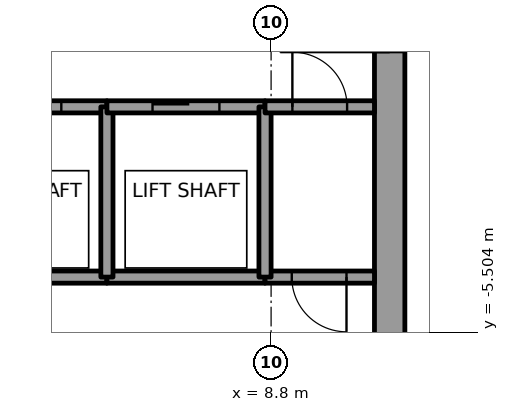
"""IFC4 building model, lengths in metres.
Left out: names, types, materials, properties, quantities, classifications, styles, units other than length and angle.
Written with IfcOpenShell. Run it as: python <this file> out.ifc"""

import sys

from ifc_helpers import new_model, si_unit, direction, frame, frame_2d, origin, place, context, subcontext, project, spatial, rectangle, extrude, element, fill, save


model = new_model("IFC4")
c1 = context("Model", 3, precision=1e-05, world=origin(), true_north=direction((0.0, 1.0)))
c2 = subcontext(c1, "Body", "Model", "MODEL_VIEW")
j1 = project(units=[si_unit("LENGTHUNIT", "METRE"), si_unit("PLANEANGLEUNIT", "RADIAN")], contexts=[c1])
p1 = place(None, origin())
s1 = spatial("IfcSite", under=j1, at=p1, CompositionType="ELEMENT")
p2 = place(p1, origin())
s2 = spatial("IfcBuilding", under=s1, at=p2, CompositionType="ELEMENT")
p3 = place(p2, frame((0.0, 0.0, 275.0)))
s3 = spatial("IfcBuildingStorey", under=s2, at=p3, CompositionType="ELEMENT", Elevation=275.0)
p4 = place(p3, frame((10.75, -7.5, 0.0), z_axis=(0.0, 0.0, 1.0), x_axis=(0.0, 1.0, 0.0)))
e1 = element("IfcWall", 1, at=p4, inside=s3, PredefinedType="SHEAR", context=c2, shape_type="SweptSolid", body=[
    extrude(rectangle(XDim=15.0, YDim=0.5, at=frame_2d((7.5, 0.0))), origin(), (0.0, 0.0, 1.0), 4.0),
])
p5 = place(p4, frame((6.6, 0.0, 0.0)))
e2 = element("IfcOpeningElement", 2, at=p5, cuts=e1, PredefinedType="OPENING", context=c2, shape_type="SweptSolid", body=[
    extrude(rectangle(XDim=1.8, YDim=2.1, at=frame_2d((0.9, 1.05))), frame((0.0, 0.25, 0.0), z_axis=(0.0, -1.0, 0.0), x_axis=(1.0, 0.0, 0.0)), (0.0, 0.0, 1.0), 0.5),
])
p6 = place(p3, frame((3.5, -1.8, 0.0), z_axis=(0.0, 0.0, 1.0), x_axis=(1.0, 0.0, 0.0)))
e3 = element("IfcWall", 3, at=p6, inside=s3, PredefinedType="SOLIDWALL", context=c2, shape_type="SweptSolid", body=[
    extrude(rectangle(XDim=2.6, YDim=0.2, at=frame_2d((1.3, 0.0))), origin(), (0.0, 0.0, 1.0), 3.85),
])
p7 = place(p6, frame((0.75, 0.0, 0.0)))
e4 = element("IfcOpeningElement", 4, at=p7, cuts=e3, PredefinedType="OPENING", context=c2, shape_type="SweptSolid", body=[
    extrude(rectangle(XDim=1.1, YDim=2.1, at=frame_2d((0.55, 1.05))), frame((0.0, 0.1, 0.0), z_axis=(0.0, -1.0, 0.0), x_axis=(1.0, 0.0, 0.0)), (0.0, 0.0, 1.0), 0.2),
])
p8 = place(p3, frame((6.1, -4.6, 0.0), z_axis=(0.0, 0.0, 1.0), x_axis=(-1.0, 0.0, 0.0)))
e5 = element("IfcWall", 5, at=p8, inside=s3, PredefinedType="SOLIDWALL", context=c2, shape_type="SweptSolid", body=[
    extrude(rectangle(XDim=1.6, YDim=0.2, at=frame_2d((0.8, 0.0))), origin(), (0.0, 0.0, 1.0), 3.85),
])
p9 = place(p3, frame((8.7, -4.6, 0.0), z_axis=(0.0, 0.0, 1.0), x_axis=(-1.0, 0.0, 0.0)))
e6 = element("IfcWall", 6, at=p9, inside=s3, PredefinedType="SOLIDWALL", context=c2, shape_type="SweptSolid", body=[
    extrude(rectangle(XDim=2.6, YDim=0.2, at=frame_2d((1.3, 0.0))), origin(), (0.0, 0.0, 1.0), 3.85),
])
p10 = place(p3, frame((6.1, -4.6, 0.0), z_axis=(0.0, 0.0, 1.0), x_axis=(0.0, 1.0, 0.0)))
e7 = element("IfcWall", 7, at=p10, inside=s3, PredefinedType="SOLIDWALL", context=c2, shape_type="SweptSolid", body=[
    extrude(rectangle(XDim=2.8, YDim=0.2, at=frame_2d((1.4, 0.0))), origin(), (0.0, 0.0, 1.0), 3.85),
])
p11 = place(p3, frame((6.1, -1.8, 0.0), z_axis=(0.0, 0.0, 1.0), x_axis=(1.0, 0.0, 0.0)))
e8 = element("IfcWall", 8, at=p11, inside=s3, PredefinedType="SOLIDWALL", context=c2, shape_type="SweptSolid", body=[
    extrude(rectangle(XDim=2.6, YDim=0.2, at=frame_2d((1.3, 0.0))), origin(), (0.0, 0.0, 1.0), 3.85),
])
p12 = place(p11, frame((0.75, 0.0, 0.0)))
e9 = element("IfcOpeningElement", 9, at=p12, cuts=e8, PredefinedType="OPENING", context=c2, shape_type="SweptSolid", body=[
    extrude(rectangle(XDim=1.1, YDim=2.1, at=frame_2d((0.55, 1.05))), frame((0.0, 0.1, 0.0), z_axis=(0.0, -1.0, 0.0), x_axis=(1.0, 0.0, 0.0)), (0.0, 0.0, 1.0), 0.2),
])
p13 = place(p3, frame((10.5, -4.6, 0.0), z_axis=(0.0, 0.0, 1.0), x_axis=(-1.0, 0.0, 0.0)))
e10 = element("IfcWall", 10, at=p13, inside=s3, PredefinedType="SOLIDWALL", context=c2, shape_type="SweptSolid", body=[
    extrude(rectangle(XDim=1.8, YDim=0.2, at=frame_2d((0.9, 0.0))), origin(), (0.0, 0.0, 1.0), 3.85),
])
p14 = place(p13, frame((0.46, 0.0, 0.0)))
e11 = element("IfcOpeningElement", 11, at=p14, cuts=e10, PredefinedType="OPENING", context=c2, shape_type="SweptSolid", body=[
    extrude(rectangle(XDim=0.9, YDim=2.1, at=frame_2d((0.45, 1.05))), frame((0.0, 0.1, 0.0), z_axis=(0.0, -1.0, 0.0), x_axis=(1.0, 0.0, 0.0)), (0.0, 0.0, 1.0), 0.2),
])
p15 = place(p3, frame((8.7, -1.8, 0.0), z_axis=(0.0, 0.0, 1.0), x_axis=(0.0, -1.0, 0.0)))
e12 = element("IfcWall", 12, at=p15, inside=s3, PredefinedType="SOLIDWALL", context=c2, shape_type="SweptSolid", body=[
    extrude(rectangle(XDim=2.8, YDim=0.2, at=frame_2d((1.4, 0.0))), origin(), (0.0, 0.0, 1.0), 3.85),
])
p16 = place(p3, frame((8.7, -1.8, 0.0), z_axis=(0.0, 0.0, 1.0), x_axis=(1.0, 0.0, 0.0)))
e13 = element("IfcWall", 13, at=p16, inside=s3, PredefinedType="SOLIDWALL", context=c2, shape_type="SweptSolid", body=[
    extrude(rectangle(XDim=1.8, YDim=0.2, at=frame_2d((0.9, 0.0))), origin(), (0.0, 0.0, 1.0), 3.85),
])
p17 = place(p16, frame((0.45, 0.0, 0.0)))
e14 = element("IfcOpeningElement", 14, at=p17, cuts=e13, PredefinedType="OPENING", context=c2, shape_type="SweptSolid", body=[
    extrude(rectangle(XDim=0.9, YDim=2.1, at=frame_2d((0.45, 1.05))), frame((0.0, 0.1, 0.0), z_axis=(0.0, -1.0, 0.0), x_axis=(1.0, 0.0, 0.0)), (0.0, 0.0, 1.0), 0.2),
])
p18 = place(p7, origin())
e15 = element("IfcDoor", 15, at=p18, inside=s3, OperationType="SLIDING_TO_LEFT", PredefinedType="DOOR", context=c2, shape_type="SweptSolid", body=[
    extrude(rectangle(XDim=1.1, YDim=2.1, at=frame_2d((0.55, 1.05))), frame((0.0, 0.025, 0.0), z_axis=(0.0, -1.0, 0.0), x_axis=(1.0, 0.0, 0.0)), (0.0, 0.0, 1.0), 0.05),
])
fill(e4, e15)
p19 = place(p12, origin())
e16 = element("IfcDoor", 16, at=p19, inside=s3, OperationType="SLIDING_TO_LEFT", PredefinedType="DOOR", context=c2, shape_type="SweptSolid", body=[
    extrude(rectangle(XDim=1.1, YDim=2.1, at=frame_2d((0.55, 1.05))), frame((0.0, 0.025, 0.0), z_axis=(0.0, -1.0, 0.0), x_axis=(1.0, 0.0, 0.0)), (0.0, 0.0, 1.0), 0.05),
])
fill(e9, e16)
p20 = place(p14, origin())
e17 = element("IfcDoor", 17, at=p20, inside=s3, OperationType="SINGLE_SWING_LEFT", PredefinedType="DOOR", context=c2, shape_type="SweptSolid", body=[
    extrude(rectangle(XDim=0.9, YDim=2.1, at=frame_2d((0.45, 1.05))), frame((0.0, 0.025, 0.0), z_axis=(0.0, -1.0, 0.0), x_axis=(1.0, 0.0, 0.0)), (0.0, 0.0, 1.0), 0.05),
])
fill(e11, e17)
p21 = place(p17, origin())
e18 = element("IfcDoor", 18, at=p21, inside=s3, OperationType="SINGLE_SWING_LEFT", PredefinedType="DOOR", context=c2, shape_type="SweptSolid", body=[
    extrude(rectangle(XDim=0.9, YDim=2.1, at=frame_2d((0.45, 1.05))), frame((0.0, 0.025, 0.0), z_axis=(0.0, -1.0, 0.0), x_axis=(1.0, 0.0, 0.0)), (0.0, 0.0, 1.0), 0.05),
])
fill(e14, e18)
p22 = place(p5, origin())
e19 = element("IfcDoor", 19, at=p22, inside=s3, OperationType="DOUBLE_DOOR_SINGLE_SWING", PredefinedType="DOOR", context=c2, shape_type="SweptSolid", body=[
    extrude(rectangle(XDim=1.8, YDim=2.1, at=frame_2d((0.9, 1.05))), frame((0.0, 0.025, 0.0), z_axis=(0.0, -1.0, 0.0), x_axis=(1.0, 0.0, 0.0)), (0.0, 0.0, 1.0), 0.05),
])
fill(e2, e19)
save(model, sys.argv[1])
